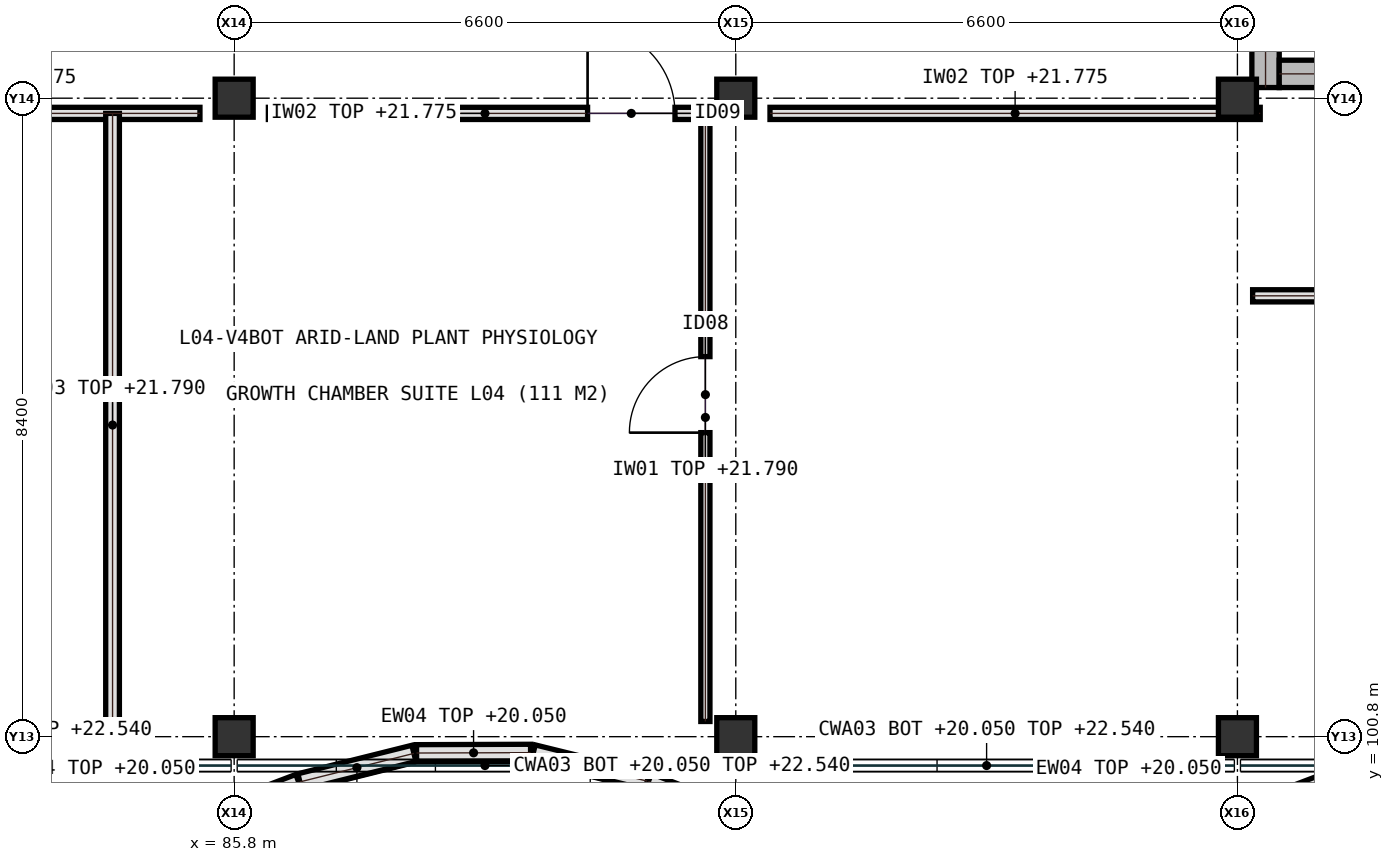
"""IFC4 building model, lengths in metres.
Left out: names, types, materials, properties, quantities, classifications, styles, units other than length and angle.
Written with IfcOpenShell. Run it as: python <this file> out.ifc"""

import sys

from ifc_helpers import new_model, si_unit, direction, frame, frame_2d, origin, origin_2d, place, context, subcontext, project, spatial, rectangle, extrude, element, fill, save


model = new_model("IFC4")
c1 = context("Model", 3, precision=1e-05, world=origin(), true_north=direction((0.0, 1.0)))
c2 = subcontext(c1, "Body", "Model", "MODEL_VIEW")
j1 = project(units=[si_unit("LENGTHUNIT", "METRE"), si_unit("PLANEANGLEUNIT", "RADIAN")], contexts=[c1])
p1 = place(None, origin())
s1 = spatial("IfcSite", under=j1, at=p1, CompositionType="ELEMENT")
p2 = place(p1, origin())
s2 = spatial("IfcBuilding", under=s1, at=p2, CompositionType="ELEMENT")
p3 = place(p2, frame((0.0, 0.0, 18.6)))
s3 = spatial("IfcBuildingStorey", under=s2, at=p3, CompositionType="ELEMENT", Elevation=18.6)
for number, where, z_axis, x_axis in (
    (1, (85.8, 100.8, 0.0), (0.0, 0.0, 1.0), (1.0, 0.0, 0.0)),
    (2, (85.8, 109.2, 0.0), (0.0, 0.0, 1.0), (1.0, 0.0, 0.0)),
    (3, (92.4, 100.8, 0.0), (0.0, 0.0, 1.0), (1.0, 0.0, 0.0)),
    (4, (92.4, 109.2, 0.0), (0.0, 0.0, 1.0), (1.0, 0.0, 0.0)),
    (5, (99.0, 100.8, 0.0), (0.0, 0.0, 1.0), (1.0, 0.0, 0.0)),
    (6, (99.0, 109.2, 0.0), (0.0, 0.0, 1.0), (1.0, 0.0, 0.0)),
):
    element("IfcColumn", number, at=place(p3, frame(where, z_axis=z_axis, x_axis=x_axis)), inside=s3, PredefinedType="COLUMN", context=c2, shape_type="SweptSolid", body=[
        extrude(rectangle(XDim=0.5, YDim=0.5, at=origin_2d()), origin(), (0.0, 0.0, 1.0), 4.2),
    ])
p4 = place(p3, frame((79.65, 109.0, 0.0), z_axis=(0.0, 0.0, 1.0), x_axis=(1.0, 0.0, 0.0)))
e7 = element("IfcWall", 7, at=p4, inside=s3, PredefinedType="PARTITIONING", context=c2, shape_type="SweptSolid", body=[
    extrude(rectangle(XDim=5.7, YDim=0.16, at=frame_2d((2.85, 0.0))), origin(), (0.0, 0.0, 1.0), 3.175),
])
p5 = place(p3, frame((86.25, 109.0, 0.0), z_axis=(0.0, 0.0, 1.0), x_axis=(1.0, 0.0, 0.0)))
e8 = element("IfcWall", 8, at=p5, inside=s3, PredefinedType="PARTITIONING", context=c2, shape_type="SweptSolid", body=[
    extrude(rectangle(XDim=5.7, YDim=0.16, at=frame_2d((2.85, 0.0))), origin(), (0.0, 0.0, 1.0), 3.175),
])
p6 = place(p5, frame((4.2, 0.0, 0.0)))
e9 = element("IfcOpeningElement", 9, at=p6, cuts=e8, PredefinedType="OPENING", context=c2, shape_type="SweptSolid", body=[
    extrude(rectangle(XDim=1.15, YDim=2.2, at=frame_2d((0.575, 1.1))), frame((0.0, 0.09, 0.0), z_axis=(0.0, -1.0, 0.0), x_axis=(1.0, 0.0, 0.0)), (0.0, 0.0, 1.0), 0.18),
])
p7 = place(p3, frame((92.85, 109.0, 0.0), z_axis=(0.0, 0.0, 1.0), x_axis=(1.0, 0.0, 0.0)))
e10 = element("IfcWall", 10, at=p7, inside=s3, PredefinedType="PARTITIONING", context=c2, shape_type="SweptSolid", body=[
    extrude(rectangle(XDim=6.45, YDim=0.16, at=frame_2d((3.225, 0.0))), origin(), (0.0, 0.0, 1.0), 3.175),
])
p8 = place(p3, frame((84.2, 100.8, 0.0), z_axis=(0.0, 0.0, 1.0), x_axis=(0.0, 1.0, 0.0)))
e11 = element("IfcWall", 11, at=p8, inside=s3, PredefinedType="SOLIDWALL", context=c2, shape_type="SweptSolid", body=[
    extrude(rectangle(XDim=8.2, YDim=0.18, at=frame_2d((4.1, 0.0))), origin(), (0.0, 0.0, 1.0), 3.19),
])
p9 = place(p3, frame((92.0, 101.0, 0.0), z_axis=(0.0, 0.0, 1.0), x_axis=(0.0, 1.0, 0.0)))
e12 = element("IfcWall", 12, at=p9, inside=s3, PredefinedType="PARTITIONING", context=c2, shape_type="SweptSolid", body=[
    extrude(rectangle(XDim=8.0, YDim=0.12, at=frame_2d((4.0, 0.0))), origin(), (0.0, 0.0, 1.0), 3.19),
])
p10 = place(p9, frame((3.8, 0.0, 0.0)))
e13 = element("IfcOpeningElement", 13, at=p10, cuts=e12, PredefinedType="OPENING", context=c2, shape_type="SweptSolid", body=[
    extrude(rectangle(XDim=1.0, YDim=2.2, at=frame_2d((0.5, 1.1))), frame((0.0, 0.07, 0.0), z_axis=(0.0, -1.0, 0.0), x_axis=(1.0, 0.0, 0.0)), (0.0, 0.0, 1.0), 0.14),
])
p11 = place(p3, frame((99.2, 106.6, 0.0), z_axis=(0.0, 0.0, 1.0), x_axis=(1.0, 0.0, 0.0)))
e14 = element("IfcWall", 14, at=p11, inside=s3, PredefinedType="PARTITIONING", context=c2, shape_type="SweptSolid", body=[
    extrude(rectangle(XDim=12.9, YDim=0.16, at=frame_2d((6.45, 0.0))), origin(), (0.0, 0.0, 1.0), 3.19),
])
p12 = place(p11, frame((4.2, 0.0, 0.0)))
e15 = element("IfcOpeningElement", 15, at=p12, cuts=e14, PredefinedType="OPENING", context=c2, shape_type="SweptSolid", body=[
    extrude(rectangle(XDim=1.05, YDim=2.15, at=frame_2d((0.525, 1.075))), frame((0.0, 0.09, 0.0), z_axis=(0.0, -1.0, 0.0), x_axis=(1.0, 0.0, 0.0)), (0.0, 0.0, 1.0), 0.18),
])
p13 = place(p3, frame((85.15, 99.63, 0.0), z_axis=(0.0, 0.0, 1.0), x_axis=(0.934769434387, 0.355254985237, 0.0)))
e16 = element("IfcWall", 16, at=p13, inside=s3, PredefinedType="SOLIDWALL", context=c2, shape_type="SweptSolid", body=[
    extrude(rectangle(XDim=1.605, YDim=0.22, at=frame_2d((0.802, 0.0))), origin(), (0.0, 0.0, 1.0), 1.45),
])
p14 = place(p3, frame((86.665, 100.205, 0.0), z_axis=(0.0, 0.0, 1.0), x_axis=(0.970142500145, 0.242535625036, 0.0)))
e17 = element("IfcWall", 17, at=p14, inside=s3, PredefinedType="SOLIDWALL", context=c2, shape_type="SweptSolid", body=[
    extrude(rectangle(XDim=1.546, YDim=0.22, at=frame_2d((0.773, 0.0))), origin(), (0.0, 0.0, 1.0), 1.45),
])
p15 = place(p3, frame((88.2, 100.585, 0.0), z_axis=(0.0, 0.0, 1.0), x_axis=(0.999994158796, 0.003417948785, 0.0)))
e18 = element("IfcWall", 18, at=p15, inside=s3, PredefinedType="SOLIDWALL", context=c2, shape_type="SweptSolid", body=[
    extrude(rectangle(XDim=1.5, YDim=0.22, at=frame_2d((0.75, 0.0))), origin(), (0.0, 0.0, 1.0), 1.45),
])
p16 = place(p3, frame((89.735, 100.585, 0.0), z_axis=(0.0, 0.0, 1.0), x_axis=(0.970918311966, -0.239411009542, 0.0)))
e19 = element("IfcWall", 19, at=p16, inside=s3, PredefinedType="SOLIDWALL", context=c2, shape_type="SweptSolid", body=[
    extrude(rectangle(XDim=1.545, YDim=0.22, at=frame_2d((0.772, 0.0))), origin(), (0.0, 0.0, 1.0), 1.45),
])
p17 = place(p3, frame((91.25, 100.21, 0.0), z_axis=(0.0, 0.0, 1.0), x_axis=(0.933756275822, -0.35790951002, 0.0)))
e20 = element("IfcWall", 20, at=p17, inside=s3, PredefinedType="SOLIDWALL", context=c2, shape_type="SweptSolid", body=[
    extrude(rectangle(XDim=1.606, YDim=0.22, at=frame_2d((0.803, 0.0))), origin(), (0.0, 0.0, 1.0), 1.45),
])
p18 = place(p3, frame((98.65, 99.63, 0.0), z_axis=(0.0, 0.0, 1.0), x_axis=(0.934769434387, 0.355254985237, 0.0)))
e21 = element("IfcWall", 21, at=p18, inside=s3, PredefinedType="SOLIDWALL", context=c2, shape_type="SweptSolid", body=[
    extrude(rectangle(XDim=1.605, YDim=0.22, at=frame_2d((0.802, 0.0))), origin(), (0.0, 0.0, 1.0), 1.45),
])
p19 = place(p3, frame((99.37, 109.34, 0.0), z_axis=(0.0, 0.0, 1.0), x_axis=(0.0, 1.0, 0.0)))
e22 = element("IfcWall", 22, at=p19, inside=s3, PredefinedType="SHEAR", context=c2, shape_type="SweptSolid", body=[
    extrude(rectangle(XDim=8.09, YDim=0.36, at=frame_2d((4.045, 0.0))), origin(), (0.0, 0.0, 1.0), 3.94),
])
p20 = place(p3, frame((99.55, 109.52, 0.0), z_axis=(0.0, 0.0, 1.0), x_axis=(1.0, 0.0, 0.0)))
e23 = element("IfcWall", 23, at=p20, inside=s3, PredefinedType="SHEAR", context=c2, shape_type="SweptSolid", body=[
    extrude(rectangle(XDim=3.8, YDim=0.36, at=frame_2d((1.9, 0.0))), origin(), (0.0, 0.0, 1.0), 3.94),
])
p21 = place(p6, origin())
e24 = element("IfcDoor", 24, at=p21, inside=s3, OperationType="SINGLE_SWING_LEFT", PredefinedType="DOOR", context=c2, shape_type="SweptSolid", body=[
    extrude(rectangle(XDim=1.15, YDim=2.2, at=frame_2d((0.575, 1.1))), frame((0.0, 0.025, 0.0), z_axis=(0.0, -1.0, 0.0), x_axis=(1.0, 0.0, 0.0)), (0.0, 0.0, 1.0), 0.05),
])
fill(e9, e24)
p22 = place(p10, origin())
e25 = element("IfcDoor", 25, at=p22, inside=s3, OperationType="SINGLE_SWING_LEFT", PredefinedType="DOOR", context=c2, shape_type="SweptSolid", body=[
    extrude(rectangle(XDim=1.0, YDim=2.2, at=frame_2d((0.5, 1.1))), frame((0.0, 0.025, 0.0), z_axis=(0.0, -1.0, 0.0), x_axis=(1.0, 0.0, 0.0)), (0.0, 0.0, 1.0), 0.05),
])
fill(e13, e25)
save(model, sys.argv[1])
